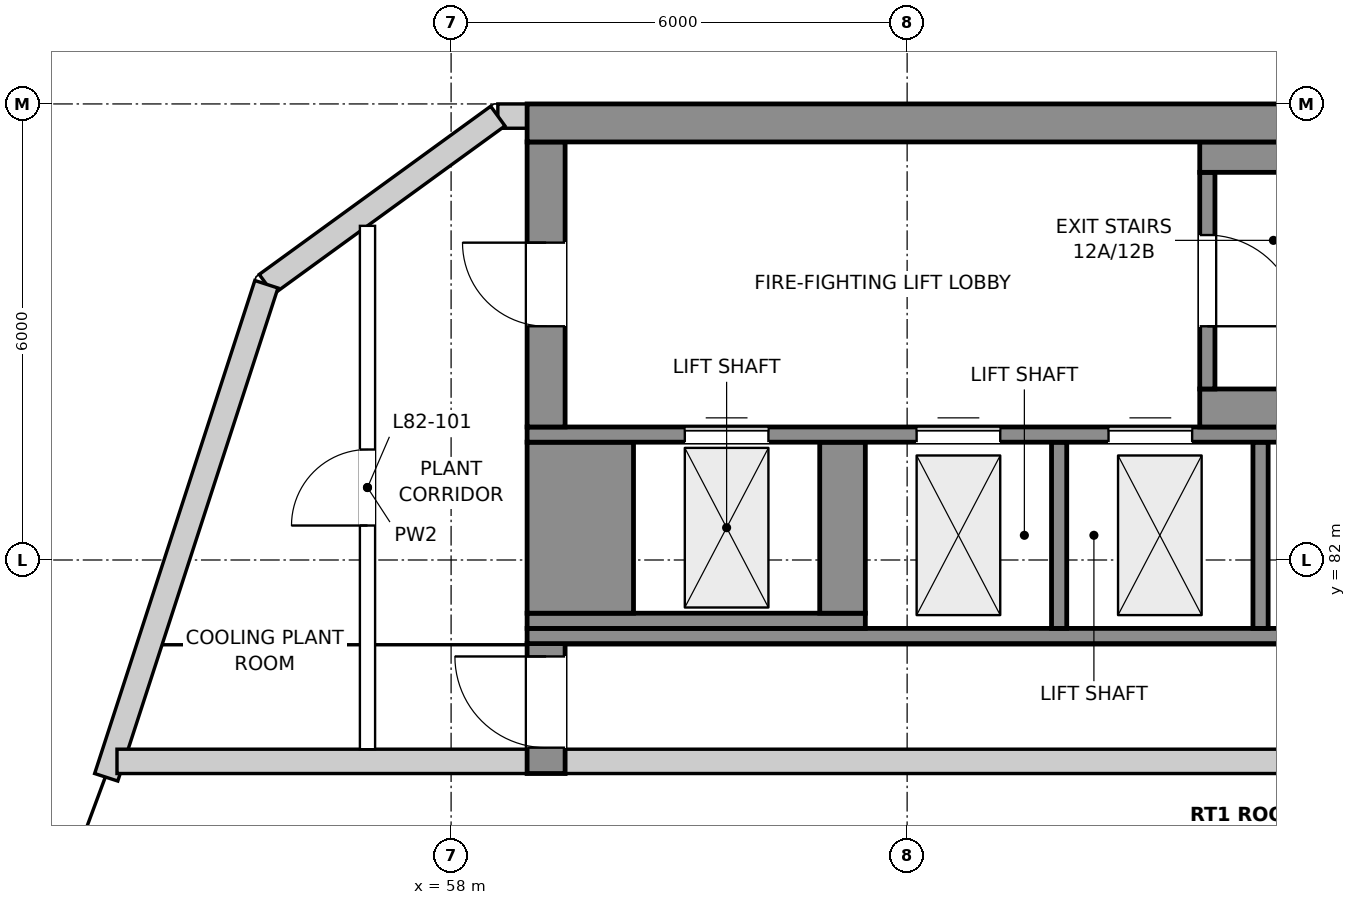
"""IFC4 building model, lengths in metres.
Left out: names, types, materials, properties, quantities, classifications, styles, units other than length and angle.
Written with IfcOpenShell. Run it as: python <this file> out.ifc"""

import sys

from ifc_helpers import new_model, si_unit, direction, frame, frame_2d, origin, place, context, subcontext, project, spatial, polyline, rectangle, outline, extrude, element, fill, save


model = new_model("IFC4")
c1 = context("Model", 3, precision=1e-05, world=origin(), true_north=direction((0.0, 1.0)))
c2 = subcontext(c1, "Body", "Model", "MODEL_VIEW")
j1 = project(units=[si_unit("LENGTHUNIT", "METRE"), si_unit("PLANEANGLEUNIT", "RADIAN")], contexts=[c1])
p1 = place(None, origin())
s1 = spatial("IfcSite", under=j1, at=p1, CompositionType="ELEMENT")
p2 = place(p1, origin())
s2 = spatial("IfcBuilding", under=s1, at=p2, CompositionType="ELEMENT")
p3 = place(p2, frame((0.0, 0.0, 351.2)))
s3 = spatial("IfcBuildingStorey", under=s2, at=p3, CompositionType="ELEMENT", Elevation=351.2)
p4 = place(p3, frame((59.0, 87.84, 0.0), z_axis=(0.0, 0.0, 1.0), x_axis=(-1.0, 0.0, 0.0)))
e1 = element("IfcWall", 1, at=p4, inside=s3, PredefinedType="SOLIDWALL", context=c2, shape_type="SweptSolid", body=[
    extrude(rectangle(XDim=0.385, YDim=0.32, at=frame_2d((0.192, 0.0))), origin(), (0.0, 0.0, 1.0), 4.2),
])
p5 = place(p3, frame((58.615, 87.84, 0.0), z_axis=(0.0, 0.0, 1.0), x_axis=(-0.809022082061, -0.58777824963, 0.0)))
e2 = element("IfcWall", 2, at=p5, inside=s3, PredefinedType="SOLIDWALL", context=c2, shape_type="SweptSolid", body=[
    extrude(rectangle(XDim=3.764, YDim=0.32, at=frame_2d((1.882, 0.0))), origin(), (0.0, 0.0, 1.0), 4.2),
])
p6 = place(p3, frame((55.57, 85.628, 0.0), z_axis=(0.0, 0.0, 1.0), x_axis=(-0.309001889909, -0.951061423901, 0.0)))
e3 = element("IfcWall", 3, at=p6, inside=s3, PredefinedType="SOLIDWALL", context=c2, shape_type="SweptSolid", body=[
    extrude(outline(polyline([(0.0, 0.0), (6.82, 0.0), (6.82, 2.656), (4.987, 4.2), (0.0, 4.2), (0.0, 0.0)])), frame((0.0, 0.16, 0.0), z_axis=(0.0, -1.0, 0.0), x_axis=(1.0, 0.0, 0.0)), (0.0, 0.0, 1.0), 0.32),
])
p7 = place(p3, frame((53.604, 79.351, 0.0), z_axis=(0.0, 0.0, 1.0), x_axis=(1.0, 0.0, 0.0)))
e4 = element("IfcWall", 4, at=p7, inside=s3, PredefinedType="SOLIDWALL", context=c2, shape_type="SweptSolid", body=[
    extrude(rectangle(XDim=5.396, YDim=0.32, at=frame_2d((2.698, 0.0))), origin(), (0.0, 0.0, 1.0), 2.842),
])
p8 = place(p3, frame((59.5, 79.351, 0.0), z_axis=(0.0, 0.0, 1.0), x_axis=(1.0, 0.0, 0.0)))
e5 = element("IfcWall", 5, at=p8, inside=s3, PredefinedType="SOLIDWALL", context=c2, shape_type="SweptSolid", body=[
    extrude(rectangle(XDim=21.0, YDim=0.32, at=frame_2d((10.5, 0.0))), origin(), (0.0, 0.0, 1.0), 2.842),
])
p9 = place(p3, frame((59.25, 79.191, 0.0), z_axis=(0.0, 0.0, 1.0), x_axis=(0.0, 1.0, 0.0)))
e6 = element("IfcWall", 6, at=p9, inside=s3, PredefinedType="SHEAR", context=c2, shape_type="SweptSolid", body=[
    extrude(outline(polyline([(0.0, 0.0), (1.709, 0.0), (1.709, 4.163), (0.0, 2.65), (0.0, 0.0)])), frame((0.0, 0.25, 0.0), z_axis=(0.0, -1.0, 0.0), x_axis=(1.0, 0.0, 0.0)), (0.0, 0.0, 1.0), 0.5),
])
p10 = place(p9, frame((0.34, 0.0, 0.0)))
e7 = element("IfcOpeningElement", 7, at=p10, cuts=e6, PredefinedType="OPENING", context=c2, shape_type="SweptSolid", body=[
    extrude(rectangle(XDim=1.2, YDim=2.1, at=frame_2d((0.6, 1.05))), frame((0.0, 0.26, 0.0), z_axis=(0.0, -1.0, 0.0), x_axis=(1.0, 0.0, 0.0)), (0.0, 0.0, 1.0), 0.52),
])
p11 = place(p3, frame((59.0, 81.0, 0.0), z_axis=(0.0, 0.0, 1.0), x_axis=(1.0, 0.0, 0.0)))
e8 = element("IfcWall", 8, at=p11, inside=s3, PredefinedType="SHEAR", context=c2, shape_type="SweptSolid", body=[
    extrude(rectangle(XDim=22.0, YDim=0.2, at=frame_2d((11.0, 0.0))), origin(), (0.0, 0.0, 1.0), 4.252),
])
p12 = place(p11, frame((11.85, 0.0, 0.0)))
e9 = element("IfcOpeningElement", 9, at=p12, cuts=e8, PredefinedType="OPENING", context=c2, shape_type="SweptSolid", body=[
    extrude(rectangle(XDim=0.9, YDim=2.1, at=frame_2d((0.45, 1.05))), frame((0.0, 0.11, 0.0), z_axis=(0.0, -1.0, 0.0), x_axis=(1.0, 0.0, 0.0)), (0.0, 0.0, 1.0), 0.22),
])
p13 = place(p11, frame((15.825, 0.0, 0.0)))
e10 = element("IfcOpeningElement", 10, at=p13, cuts=e8, PredefinedType="OPENING", context=c2, shape_type="SweptSolid", body=[
    extrude(rectangle(XDim=0.9, YDim=2.1, at=frame_2d((0.45, 1.05))), frame((0.0, 0.11, 0.0), z_axis=(0.0, -1.0, 0.0), x_axis=(1.0, 0.0, 0.0)), (0.0, 0.0, 1.0), 0.22),
])
p14 = place(p3, frame((59.0, 81.2, 0.0), z_axis=(0.0, 0.0, 1.0), x_axis=(1.0, 0.0, 0.0)))
e11 = element("IfcWall", 11, at=p14, inside=s3, PredefinedType="SHEAR", context=c2, shape_type="SweptSolid", body=[
    extrude(rectangle(XDim=4.45, YDim=0.2, at=frame_2d((2.225, 0.0))), origin(), (0.0, 0.0, 1.0), 4.429),
])
for number, where, z_axis, x_axis in (
    (12, (66.0, 81.1, 0.0), (0.0, 0.0, 1.0), (0.0, 1.0, 0.0)),
    (13, (68.65, 81.1, 0.0), (0.0, 0.0, 1.0), (0.0, 1.0, 0.0)),
):
    element("IfcWall", number, at=place(p3, frame(where, z_axis=z_axis, x_axis=x_axis)), inside=s3, PredefinedType="SHEAR", context=c2, shape_type="SweptSolid", body=[
        extrude(outline(polyline([(0.0, 0.0), (2.45, 0.0), (2.45, 4.5), (0.0, 4.341), (0.0, 0.0)])), frame((0.0, 0.1, 0.0), z_axis=(0.0, -1.0, 0.0), x_axis=(1.0, 0.0, 0.0)), (0.0, 0.0, 1.0), 0.2),
    ])
p15 = place(p3, frame((59.7, 81.3, 0.0), z_axis=(0.0, 0.0, 1.0), x_axis=(0.0, 1.0, 0.0)))
e14 = element("IfcWall", 14, at=p15, inside=s3, PredefinedType="SHEAR", context=c2, shape_type="SweptSolid", body=[
    extrude(rectangle(XDim=2.25, YDim=1.4, at=frame_2d((1.125, 0.0))), origin(), (0.0, 0.0, 1.0), 4.5),
])
p16 = place(p3, frame((63.15, 81.3, 0.0), z_axis=(0.0, 0.0, 1.0), x_axis=(0.0, 1.0, 0.0)))
e15 = element("IfcWall", 15, at=p16, inside=s3, PredefinedType="SHEAR", context=c2, shape_type="SweptSolid", body=[
    extrude(rectangle(XDim=2.25, YDim=0.6, at=frame_2d((1.125, 0.0))), origin(), (0.0, 0.0, 1.0), 4.5),
])
p17 = place(p3, frame((59.0, 83.65, 0.0), z_axis=(0.0, 0.0, 1.0), x_axis=(1.0, 0.0, 0.0)))
e16 = element("IfcWall", 16, at=p17, inside=s3, PredefinedType="SHEAR", context=c2, shape_type="SweptSolid", body=[
    extrude(rectangle(XDim=22.0, YDim=0.2, at=frame_2d((11.0, 0.0))), origin(), (0.0, 0.0, 1.0), 4.5),
])
p18 = place(p17, frame((5.125, 0.0, 0.0)))
e17 = element("IfcOpeningElement", 17, at=p18, cuts=e16, PredefinedType="OPENING", context=c2, shape_type="SweptSolid", body=[
    extrude(rectangle(XDim=1.1, YDim=2.1, at=frame_2d((0.55, 1.05))), frame((0.0, 0.11, 0.0), z_axis=(0.0, -1.0, 0.0), x_axis=(1.0, 0.0, 0.0)), (0.0, 0.0, 1.0), 0.22),
])
p19 = place(p17, frame((7.65, 0.0, 0.0)))
e18 = element("IfcOpeningElement", 18, at=p19, cuts=e16, PredefinedType="OPENING", context=c2, shape_type="SweptSolid", body=[
    extrude(rectangle(XDim=1.1, YDim=2.1, at=frame_2d((0.55, 1.05))), frame((0.0, 0.11, 0.0), z_axis=(0.0, -1.0, 0.0), x_axis=(1.0, 0.0, 0.0)), (0.0, 0.0, 1.0), 0.22),
])
p20 = place(p17, frame((18.775, 0.0, 0.0)))
e19 = element("IfcOpeningElement", 19, at=p20, cuts=e16, PredefinedType="OPENING", context=c2, shape_type="SweptSolid", body=[
    extrude(rectangle(XDim=1.2, YDim=2.1, at=frame_2d((0.6, 1.05))), frame((0.0, 0.11, 0.0), z_axis=(0.0, -1.0, 0.0), x_axis=(1.0, 0.0, 0.0)), (0.0, 0.0, 1.0), 0.22),
])
p21 = place(p17, frame((2.075, 0.0, 0.0)))
e20 = element("IfcOpeningElement", 20, at=p21, cuts=e16, PredefinedType="OPENING", context=c2, shape_type="SweptSolid", body=[
    extrude(rectangle(XDim=1.1, YDim=2.1, at=frame_2d((0.55, 1.05))), frame((0.0, 0.11, 0.0), z_axis=(0.0, -1.0, 0.0), x_axis=(1.0, 0.0, 0.0)), (0.0, 0.0, 1.0), 0.22),
])
p22 = place(p3, frame((59.25, 83.75, 0.0), z_axis=(0.0, 0.0, 1.0), x_axis=(0.0, 1.0, 0.0)))
e21 = element("IfcWall", 21, at=p22, inside=s3, PredefinedType="SHEAR", context=c2, shape_type="SweptSolid", body=[
    extrude(rectangle(XDim=3.75, YDim=0.5, at=frame_2d((1.875, 0.0))), origin(), (0.0, 0.0, 1.0), 4.5),
])
p23 = place(p22, frame((1.325, 0.0, 0.0)))
e22 = element("IfcOpeningElement", 22, at=p23, cuts=e21, PredefinedType="OPENING", context=c2, shape_type="SweptSolid", body=[
    extrude(rectangle(XDim=1.1, YDim=2.1, at=frame_2d((0.55, 1.05))), frame((0.0, 0.26, 0.0), z_axis=(0.0, -1.0, 0.0), x_axis=(1.0, 0.0, 0.0)), (0.0, 0.0, 1.0), 0.52),
])
p24 = place(p3, frame((67.85, 84.0, 0.0), z_axis=(0.0, 0.0, 1.0), x_axis=(1.0, 0.0, 0.0)))
e23 = element("IfcWall", 23, at=p24, inside=s3, PredefinedType="SHEAR", context=c2, shape_type="SweptSolid", body=[
    extrude(rectangle(XDim=9.1, YDim=0.5, at=frame_2d((4.55, 0.0))), origin(), (0.0, 0.0, 1.0), 4.5),
])
p25 = place(p3, frame((67.95, 84.25, 0.0), z_axis=(0.0, 0.0, 1.0), x_axis=(0.0, 1.0, 0.0)))
e24 = element("IfcWall", 24, at=p25, inside=s3, PredefinedType="SHEAR", context=c2, shape_type="SweptSolid", body=[
    extrude(rectangle(XDim=2.85, YDim=0.2, at=frame_2d((1.425, 0.0))), origin(), (0.0, 0.0, 1.0), 4.5),
])
p26 = place(p25, frame((0.825, 0.0, 0.0)))
e25 = element("IfcOpeningElement", 25, at=p26, cuts=e24, PredefinedType="OPENING", context=c2, shape_type="SweptSolid", body=[
    extrude(rectangle(XDim=1.2, YDim=2.1, at=frame_2d((0.6, 1.05))), frame((0.0, 0.11, 0.0), z_axis=(0.0, -1.0, 0.0), x_axis=(1.0, 0.0, 0.0)), (0.0, 0.0, 1.0), 0.22),
])
p27 = place(p3, frame((67.85, 87.3, 0.0), z_axis=(0.0, 0.0, 1.0), x_axis=(1.0, 0.0, 0.0)))
e26 = element("IfcWall", 26, at=p27, inside=s3, PredefinedType="SHEAR", context=c2, shape_type="SweptSolid", body=[
    extrude(rectangle(XDim=9.1, YDim=0.4, at=frame_2d((4.55, 0.0))), origin(), (0.0, 0.0, 1.0), 4.5),
])
p28 = place(p3, frame((59.0, 87.75, 0.0), z_axis=(0.0, 0.0, 1.0), x_axis=(1.0, 0.0, 0.0)))
e27 = element("IfcWall", 27, at=p28, inside=s3, PredefinedType="SHEAR", context=c2, shape_type="SweptSolid", body=[
    extrude(rectangle(XDim=22.0, YDim=0.5, at=frame_2d((11.0, 0.0))), origin(), (0.0, 0.0, 1.0), 4.5),
])
p29 = place(p3, frame((56.9, 79.511, 0.0), z_axis=(0.0, 0.0, 1.0), x_axis=(0.0, 1.0, 0.0)))
e28 = element("IfcWall", 28, at=p29, inside=s3, PredefinedType="PARTITIONING", context=c2, shape_type="SweptSolid", body=[
    extrude(outline(polyline([(0.0, 0.0), (6.885, 0.0), (6.885, 3.75), (0.0, 2.833), (0.0, 0.0)])), frame((0.0, 0.1, 0.0), z_axis=(0.0, -1.0, 0.0), x_axis=(1.0, 0.0, 0.0)), (0.0, 0.0, 1.0), 0.2),
])
p30 = place(p29, frame((2.943, 0.0, 0.0)))
e29 = element("IfcOpeningElement", 29, at=p30, cuts=e28, PredefinedType="OPENING", context=c2, shape_type="SweptSolid", body=[
    extrude(rectangle(XDim=1.0, YDim=2.1, at=frame_2d((0.5, 1.05))), frame((0.0, 0.11, 0.0), z_axis=(0.0, -1.0, 0.0), x_axis=(1.0, 0.0, 0.0)), (0.0, 0.0, 1.0), 0.22),
])
p31 = place(p26, frame((1.2, 0.0, 0.0), z_axis=(0.0, 0.0, 1.0), x_axis=(-1.0, 0.0, 0.0)))
e30 = element("IfcDoor", 30, at=p31, inside=s3, OperationType="SINGLE_SWING_RIGHT", PredefinedType="DOOR", context=c2, shape_type="SweptSolid", body=[
    extrude(rectangle(XDim=1.2, YDim=2.1, at=frame_2d((0.6, 1.05))), frame((0.0, 0.025, 0.0), z_axis=(0.0, -1.0, 0.0), x_axis=(1.0, 0.0, 0.0)), (0.0, 0.0, 1.0), 0.05),
])
fill(e25, e30)
p32 = place(p10, origin())
e31 = element("IfcDoor", 31, at=p32, inside=s3, OperationType="SINGLE_SWING_RIGHT", PredefinedType="DOOR", context=c2, shape_type="SweptSolid", body=[
    extrude(rectangle(XDim=1.2, YDim=2.1, at=frame_2d((0.6, 1.05))), frame((0.0, 0.025, 0.0), z_axis=(0.0, -1.0, 0.0), x_axis=(1.0, 0.0, 0.0)), (0.0, 0.0, 1.0), 0.05),
])
fill(e7, e31)
p33 = place(p23, origin())
e32 = element("IfcDoor", 32, at=p33, inside=s3, OperationType="SINGLE_SWING_RIGHT", PredefinedType="DOOR", context=c2, shape_type="SweptSolid", body=[
    extrude(rectangle(XDim=1.1, YDim=2.1, at=frame_2d((0.55, 1.05))), frame((0.0, 0.025, 0.0), z_axis=(0.0, -1.0, 0.0), x_axis=(1.0, 0.0, 0.0)), (0.0, 0.0, 1.0), 0.05),
])
fill(e22, e32)
p34 = place(p18, origin())
e33 = element("IfcDoor", 33, at=p34, inside=s3, OperationType="DOUBLE_DOOR_SLIDING", PredefinedType="DOOR", context=c2, shape_type="SweptSolid", body=[
    extrude(rectangle(XDim=1.1, YDim=2.1, at=frame_2d((0.55, 1.05))), frame((0.0, 0.025, 0.0), z_axis=(0.0, -1.0, 0.0), x_axis=(1.0, 0.0, 0.0)), (0.0, 0.0, 1.0), 0.05),
])
fill(e17, e33)
p35 = place(p19, origin())
e34 = element("IfcDoor", 34, at=p35, inside=s3, OperationType="DOUBLE_DOOR_SLIDING", PredefinedType="DOOR", context=c2, shape_type="SweptSolid", body=[
    extrude(rectangle(XDim=1.1, YDim=2.1, at=frame_2d((0.55, 1.05))), frame((0.0, 0.025, 0.0), z_axis=(0.0, -1.0, 0.0), x_axis=(1.0, 0.0, 0.0)), (0.0, 0.0, 1.0), 0.05),
])
fill(e18, e34)
p36 = place(p21, origin())
e35 = element("IfcDoor", 35, at=p36, inside=s3, OperationType="DOUBLE_DOOR_SLIDING", PredefinedType="DOOR", context=c2, shape_type="SweptSolid", body=[
    extrude(rectangle(XDim=1.1, YDim=2.1, at=frame_2d((0.55, 1.05))), frame((0.0, 0.025, 0.0), z_axis=(0.0, -1.0, 0.0), x_axis=(1.0, 0.0, 0.0)), (0.0, 0.0, 1.0), 0.05),
])
fill(e20, e35)
p37 = place(p30, origin())
e36 = element("IfcDoor", 36, at=p37, inside=s3, OperationType="SINGLE_SWING_LEFT", PredefinedType="DOOR", context=c2, shape_type="SweptSolid", body=[
    extrude(rectangle(XDim=1.0, YDim=2.1, at=frame_2d((0.5, 1.05))), frame((0.0, 0.025, 0.0), z_axis=(0.0, -1.0, 0.0), x_axis=(1.0, 0.0, 0.0)), (0.0, 0.0, 1.0), 0.05),
])
fill(e29, e36)
save(model, sys.argv[1])
